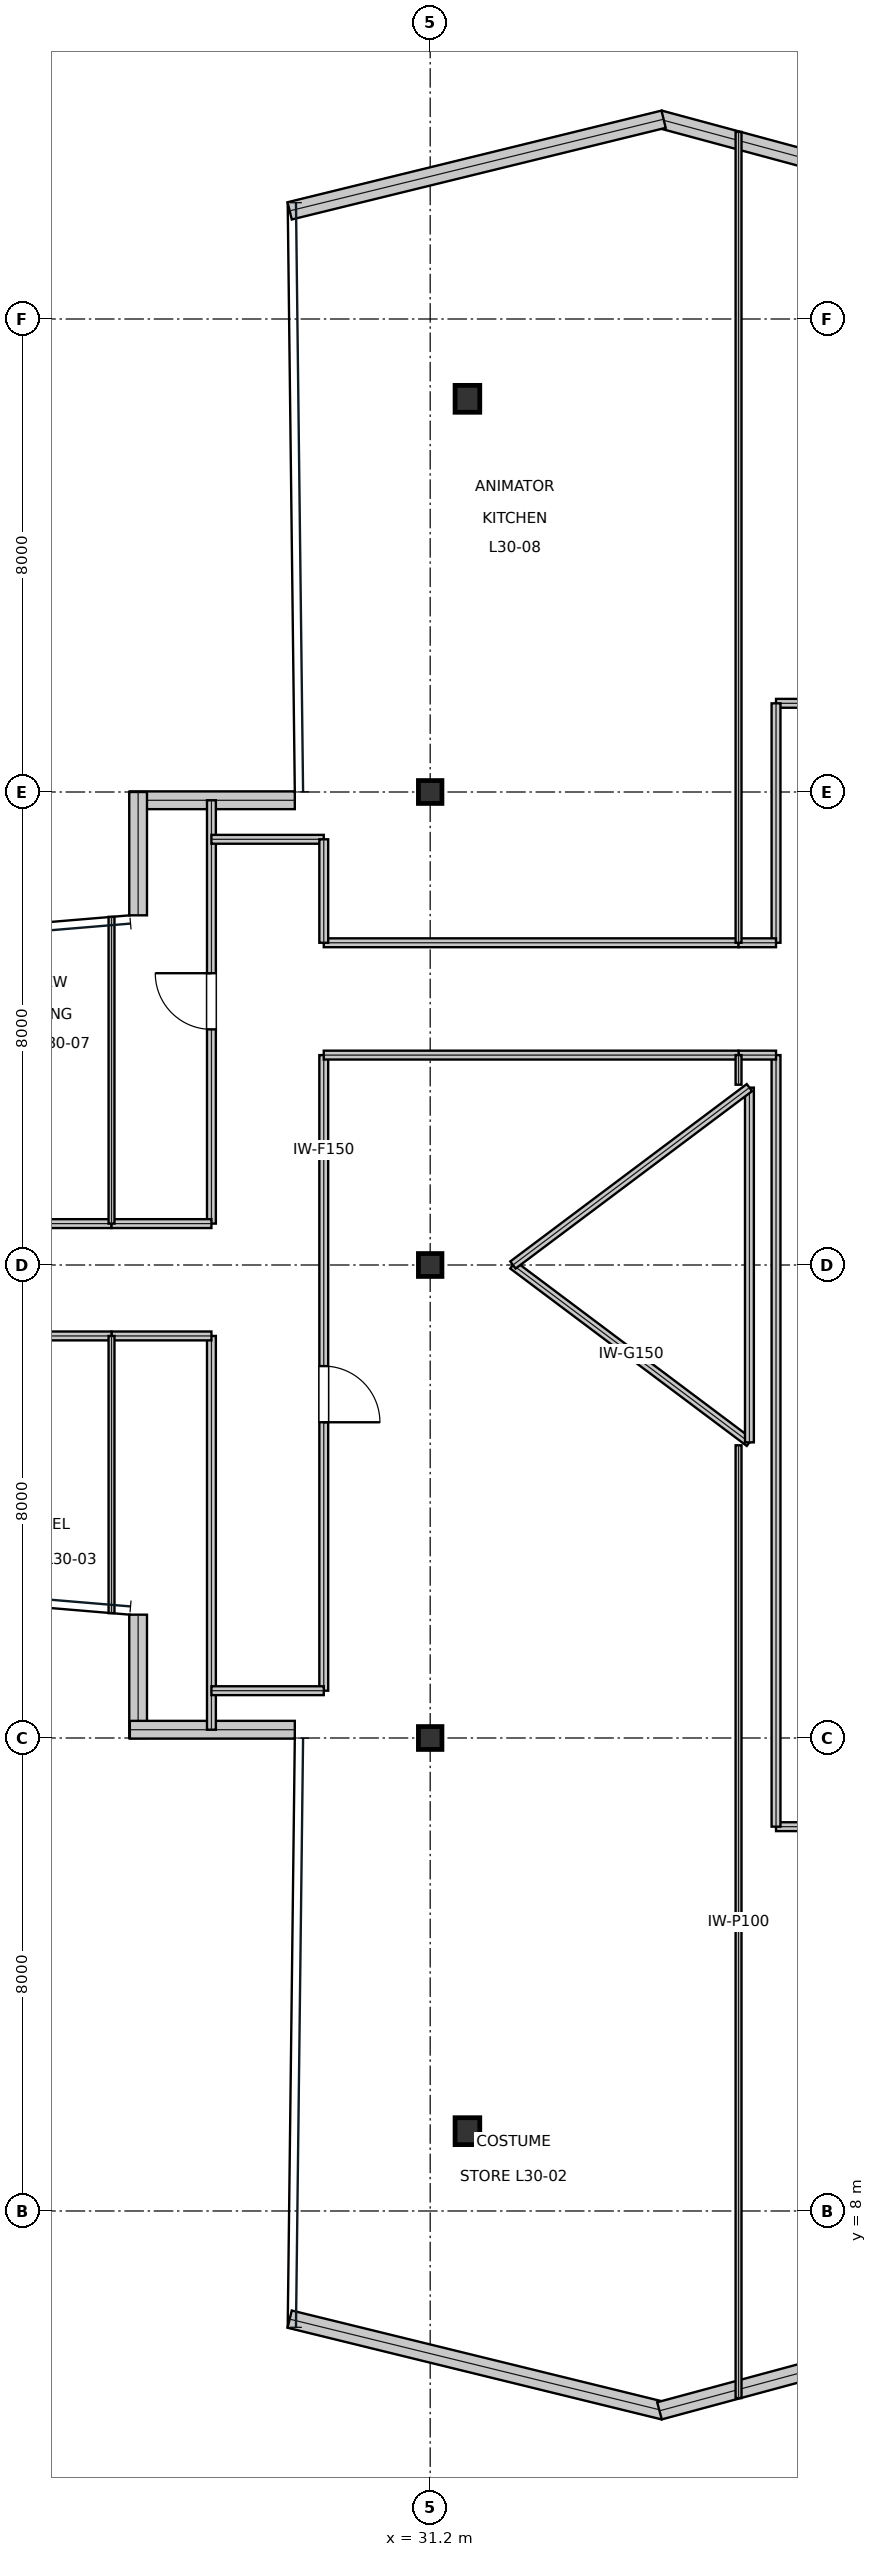
"""IFC4 building model, lengths in metres.
Left out: names, types, materials, properties, quantities, classifications, styles, units other than length and angle.
Written with IfcOpenShell. Run it as: python <this file> out.ifc"""

import sys

from ifc_helpers import new_model, si_unit, direction, frame, frame_2d, origin, origin_2d, place, context, subcontext, project, spatial, rectangle, i_section, extrude, element, fill, save


model = new_model("IFC4")
c1 = context("Model", 3, precision=1e-05, world=origin(), true_north=direction((0.0, 1.0)))
c2 = subcontext(c1, "Body", "Model", "MODEL_VIEW")
j1 = project(units=[si_unit("LENGTHUNIT", "METRE"), si_unit("PLANEANGLEUNIT", "RADIAN")], contexts=[c1])
p1 = place(None, origin())
s1 = spatial("IfcSite", under=j1, at=p1, CompositionType="ELEMENT")
p2 = place(p1, origin())
s2 = spatial("IfcBuilding", under=s1, at=p2, CompositionType="ELEMENT")
p3 = place(p2, frame((0.0, 0.0, 133.05)))
s3 = spatial("IfcBuildingStorey", under=s2, at=p3, CompositionType="ELEMENT", Elevation=133.05)
for number, where, z_axis, x_axis in (
    (1, (31.2, 16.0, 0.0), (0.0, 0.0, 1.0), (1.0, 0.0, 0.0)),
    (2, (31.2, 24.0, 0.0), (0.0, 0.0, 1.0), (1.0, 0.0, 0.0)),
    (3, (31.2, 32.0, 0.0), (0.0, 0.0, 1.0), (1.0, 0.0, 0.0)),
):
    element("IfcColumn", number, at=place(p3, frame(where, z_axis=z_axis, x_axis=x_axis)), inside=s3, PredefinedType="COLUMN", context=c2, shape_type="SweptSolid", body=[
        extrude(i_section(OverallWidth=0.398, OverallDepth=0.387, WebThickness=0.021, FlangeThickness=0.033, at=origin_2d()), origin(), (0.0, 0.0, 1.0), 4.044),
    ])
for number, where, z_axis, x_axis in (
    (4, (31.83, 38.65, 0.016), (0.0, 0.0, 1.0), (1.0, 0.0, 0.0)),
    (5, (31.83, 9.35, 0.016), (0.0, 0.0, 1.0), (1.0, 0.0, 0.0)),
):
    element("IfcColumn", number, at=place(p3, frame(where, z_axis=z_axis, x_axis=x_axis)), inside=s3, PredefinedType="COLUMN", context=c2, shape_type="SweptSolid", body=[
        extrude(i_section(OverallWidth=0.418, OverallDepth=0.455, WebThickness=0.042, FlangeThickness=0.068, at=origin_2d()), origin(), (0.0, 0.0, 1.0), 4.018),
    ])
p4 = place(p3, frame((41.404, 41.675, 0.0), z_axis=(0.0, 0.0, 1.0), x_axis=(-0.965531145086, 0.260287548434, 0.0)))
e6 = element("IfcWall", 6, at=p4, inside=s3, PredefinedType="STANDARD", context=c2, shape_type="SweptSolid", body=[
    extrude(rectangle(XDim=6.551, YDim=0.3, at=frame_2d((3.275, 0.0))), origin(), (0.0, 0.0, 1.0), 3.81),
])
p5 = place(p3, frame((35.148, 43.379, 0.0), z_axis=(0.0, 0.0, 1.0), x_axis=(-0.971267606245, -0.23798999361, 0.0)))
e7 = element("IfcWall", 7, at=p5, inside=s3, PredefinedType="STANDARD", context=c2, shape_type="SweptSolid", body=[
    extrude(rectangle(XDim=6.512, YDim=0.3, at=frame_2d((3.256, 0.0))), origin(), (0.0, 0.0, 1.0), 3.81),
])
p6 = place(p3, frame((28.91, 31.86, 0.0), z_axis=(0.0, 0.0, 1.0), x_axis=(-1.0, 0.0, 0.0)))
e8 = element("IfcWall", 8, at=p6, inside=s3, PredefinedType="STANDARD", context=c2, shape_type="SweptSolid", body=[
    extrude(rectangle(XDim=2.79, YDim=0.3, at=frame_2d((1.395, 0.0))), origin(), (0.0, 0.0, 1.0), 3.81),
])
for number, where, z_axis, x_axis in (
    (9, (26.26, 32.0, 0.0), (0.0, 0.0, 1.0), (0.0, -1.0, 0.0)),
    (10, (26.26, 18.086, 0.0), (0.0, 0.0, 1.0), (0.0, -1.0, 0.0)),
):
    element("IfcWall", number, at=place(p3, frame(where, z_axis=z_axis, x_axis=x_axis)), inside=s3, PredefinedType="STANDARD", context=c2, shape_type="SweptSolid", body=[
        extrude(rectangle(XDim=2.086, YDim=0.3, at=frame_2d((1.043, 0.0))), origin(), (0.0, 0.0, 1.0), 3.338),
    ])
p7 = place(p3, frame((26.12, 16.14, 0.0), z_axis=(0.0, 0.0, 1.0), x_axis=(1.0, 0.0, 0.0)))
e11 = element("IfcWall", 11, at=p7, inside=s3, PredefinedType="STANDARD", context=c2, shape_type="SweptSolid", body=[
    extrude(rectangle(XDim=2.79, YDim=0.3, at=frame_2d((1.395, 0.0))), origin(), (0.0, 0.0, 1.0), 3.81),
])
p8 = place(p3, frame((28.823, 6.171, 0.0), z_axis=(0.0, 0.0, 1.0), x_axis=(0.971267606245, -0.23798999361, 0.0)))
e12 = element("IfcWall", 12, at=p8, inside=s3, PredefinedType="STANDARD", context=c2, shape_type="SweptSolid", body=[
    extrude(rectangle(XDim=6.512, YDim=0.3, at=frame_2d((3.256, 0.0))), origin(), (0.0, 0.0, 1.0), 3.81),
])
p9 = place(p3, frame((35.079, 4.62, 0.0), z_axis=(0.0, 0.0, 1.0), x_axis=(0.965531145086, 0.260287548434, 0.0)))
e13 = element("IfcWall", 13, at=p9, inside=s3, PredefinedType="STANDARD", context=c2, shape_type="SweptSolid", body=[
    extrude(rectangle(XDim=6.551, YDim=0.3, at=frame_2d((3.275, 0.0))), origin(), (0.0, 0.0, 1.0), 3.81),
])
p10 = place(p3, frame((37.05, 14.5, 0.0), z_axis=(0.0, 0.0, 1.0), x_axis=(1.0, 0.0, 0.0)))
e14 = element("IfcWall", 14, at=p10, inside=s3, PredefinedType="PARTITIONING", context=c2, shape_type="SweptSolid", body=[
    extrude(rectangle(XDim=1.9, YDim=0.15, at=frame_2d((0.95, 0.0))), origin(), (0.0, 0.0, 1.0), 3.19),
])
p11 = place(p10, frame((0.475, 0.0, 0.0)))
e15 = element("IfcOpeningElement", 15, at=p11, cuts=e14, PredefinedType="OPENING", context=c2, shape_type="SweptSolid", body=[
    extrude(rectangle(XDim=0.95, YDim=2.15, at=frame_2d((0.475, 1.075))), frame((0.0, 0.085, 0.0), z_axis=(0.0, -1.0, 0.0), x_axis=(1.0, 0.0, 0.0)), (0.0, 0.0, 1.0), 0.17),
])
p12 = place(p3, frame((29.4, 16.8, 0.0), z_axis=(0.0, 0.0, 1.0), x_axis=(0.0, 1.0, 0.0)))
e16 = element("IfcWall", 16, at=p12, inside=s3, PredefinedType="PARTITIONING", context=c2, shape_type="SweptSolid", body=[
    extrude(rectangle(XDim=10.75, YDim=0.15, at=frame_2d((5.375, 0.0))), origin(), (0.0, 0.0, 1.0), 3.19),
])
p13 = place(p12, frame((4.54, 0.0, 0.0)))
e17 = element("IfcOpeningElement", 17, at=p13, cuts=e16, PredefinedType="OPENING", context=c2, shape_type="SweptSolid", body=[
    extrude(rectangle(XDim=0.95, YDim=2.15, at=frame_2d((0.475, 1.075))), frame((0.0, 0.085, 0.0), z_axis=(0.0, -1.0, 0.0), x_axis=(1.0, 0.0, 0.0)), (0.0, 0.0, 1.0), 0.17),
])
p14 = place(p3, frame((27.5, 24.7, 0.0), z_axis=(0.0, 0.0, 1.0), x_axis=(0.0, 1.0, 0.0)))
e18 = element("IfcWall", 18, at=p14, inside=s3, PredefinedType="PARTITIONING", context=c2, shape_type="SweptSolid", body=[
    extrude(rectangle(XDim=7.16, YDim=0.15, at=frame_2d((3.58, 0.0))), origin(), (0.0, 0.0, 1.0), 3.338),
])
p15 = place(p14, frame((3.285, 0.0, 0.0)))
e19 = element("IfcOpeningElement", 19, at=p15, cuts=e18, PredefinedType="OPENING", context=c2, shape_type="SweptSolid", body=[
    extrude(rectangle(XDim=0.95, YDim=2.15, at=frame_2d((0.475, 1.075))), frame((0.0, 0.085, 0.0), z_axis=(0.0, -1.0, 0.0), x_axis=(1.0, 0.0, 0.0)), (0.0, 0.0, 1.0), 0.17),
])
p16 = place(p3, frame((37.05, 33.5, 0.0), z_axis=(0.0, 0.0, 1.0), x_axis=(1.0, 0.0, 0.0)))
e20 = element("IfcWall", 20, at=p16, inside=s3, PredefinedType="PARTITIONING", context=c2, shape_type="SweptSolid", body=[
    extrude(rectangle(XDim=1.9, YDim=0.15, at=frame_2d((0.95, 0.0))), origin(), (0.0, 0.0, 1.0), 3.19),
])
p17 = place(p16, frame((0.475, 0.0, 0.0)))
e21 = element("IfcOpeningElement", 21, at=p17, cuts=e20, PredefinedType="OPENING", context=c2, shape_type="SweptSolid", body=[
    extrude(rectangle(XDim=0.95, YDim=2.15, at=frame_2d((0.475, 1.075))), frame((0.0, 0.085, 0.0), z_axis=(0.0, -1.0, 0.0), x_axis=(1.0, 0.0, 0.0)), (0.0, 0.0, 1.0), 0.17),
])
p18 = place(p3, frame((37.05, 14.5, 0.0), z_axis=(0.0, 0.0, 1.0), x_axis=(0.0, 1.0, 0.0)))
e22 = element("IfcWall", 22, at=p18, inside=s3, PredefinedType="PARTITIONING", context=c2, shape_type="SweptSolid", body=[
    extrude(rectangle(XDim=13.05, YDim=0.15, at=frame_2d((6.525, 0.0))), origin(), (0.0, 0.0, 1.0), 3.19),
])
p19 = place(p3, frame((36.416, 27.55, 0.0), z_axis=(0.0, 0.0, 1.0), x_axis=(1.0, 0.0, 0.0)))
e23 = element("IfcWall", 23, at=p19, inside=s3, PredefinedType="PARTITIONING", context=c2, shape_type="SweptSolid", body=[
    extrude(rectangle(XDim=0.634, YDim=0.15, at=frame_2d((0.317, 0.0))), origin(), (0.0, 0.0, 1.0), 3.443),
])
p20 = place(p3, frame((29.4, 27.55, 0.0), z_axis=(0.0, 0.0, 1.0), x_axis=(1.0, 0.0, 0.0)))
e24 = element("IfcWall", 24, at=p20, inside=s3, PredefinedType="PARTITIONING", context=c2, shape_type="SweptSolid", body=[
    extrude(rectangle(XDim=7.016, YDim=0.15, at=frame_2d((3.508, 0.0))), origin(), (0.0, 0.0, 1.0), 3.19),
])
p21 = place(p3, frame((27.5, 16.14, 0.0), z_axis=(0.0, 0.0, 1.0), x_axis=(0.0, 1.0, 0.0)))
e25 = element("IfcWall", 25, at=p21, inside=s3, PredefinedType="PARTITIONING", context=c2, shape_type="SweptSolid", body=[
    extrude(rectangle(XDim=6.66, YDim=0.15, at=frame_2d((3.33, 0.0))), origin(), (0.0, 0.0, 1.0), 3.338),
])
p22 = place(p3, frame((27.5, 16.8, 0.0), z_axis=(0.0, 0.0, 1.0), x_axis=(1.0, 0.0, 0.0)))
e26 = element("IfcWall", 26, at=p22, inside=s3, PredefinedType="PARTITIONING", context=c2, shape_type="SweptSolid", body=[
    extrude(rectangle(XDim=1.9, YDim=0.15, at=frame_2d((0.95, 0.0))), origin(), (0.0, 0.0, 1.0), 3.338),
])
p23 = place(p3, frame((25.81, 22.8, 0.0), z_axis=(0.0, 0.0, 1.0), x_axis=(1.0, 0.0, 0.0)))
e27 = element("IfcWall", 27, at=p23, inside=s3, PredefinedType="PARTITIONING", context=c2, shape_type="SweptSolid", body=[
    extrude(rectangle(XDim=1.69, YDim=0.15, at=frame_2d((0.845, 0.0))), origin(), (0.0, 0.0, 1.0), 3.81),
])
for number, where, z_axis, x_axis in (
    (28, (23.1, 22.8, 0.0), (0.0, 0.0, 1.0), (1.0, 0.0, 0.0)),
    (29, (23.1, 24.7, 0.0), (0.0, 0.0, 1.0), (1.0, 0.0, 0.0)),
):
    element("IfcWall", number, at=place(p3, frame(where, z_axis=z_axis, x_axis=x_axis)), inside=s3, PredefinedType="PARTITIONING", context=c2, shape_type="SweptSolid", body=[
        extrude(rectangle(XDim=2.71, YDim=0.15, at=frame_2d((1.355, 0.0))), origin(), (0.0, 0.0, 1.0), 3.19),
    ])
p24 = place(p3, frame((29.4, 29.45, 0.0), z_axis=(0.0, 0.0, 1.0), x_axis=(1.0, 0.0, 0.0)))
e30 = element("IfcWall", 30, at=p24, inside=s3, PredefinedType="PARTITIONING", context=c2, shape_type="SweptSolid", body=[
    extrude(rectangle(XDim=7.016, YDim=0.15, at=frame_2d((3.508, 0.0))), origin(), (0.0, 0.0, 1.0), 3.19),
])
p25 = place(p3, frame((27.5, 31.2, 0.0), z_axis=(0.0, 0.0, 1.0), x_axis=(1.0, 0.0, 0.0)))
e31 = element("IfcWall", 31, at=p25, inside=s3, PredefinedType="PARTITIONING", context=c2, shape_type="SweptSolid", body=[
    extrude(rectangle(XDim=1.9, YDim=0.15, at=frame_2d((0.95, 0.0))), origin(), (0.0, 0.0, 1.0), 3.338),
])
p26 = place(p3, frame((29.4, 29.45, 0.0), z_axis=(0.0, 0.0, 1.0), x_axis=(0.0, 1.0, 0.0)))
e32 = element("IfcWall", 32, at=p26, inside=s3, PredefinedType="PARTITIONING", context=c2, shape_type="SweptSolid", body=[
    extrude(rectangle(XDim=1.75, YDim=0.15, at=frame_2d((0.875, 0.0))), origin(), (0.0, 0.0, 1.0), 3.81),
])
p27 = place(p3, frame((25.81, 24.7, 0.0), z_axis=(0.0, 0.0, 1.0), x_axis=(1.0, 0.0, 0.0)))
e33 = element("IfcWall", 33, at=p27, inside=s3, PredefinedType="PARTITIONING", context=c2, shape_type="SweptSolid", body=[
    extrude(rectangle(XDim=1.69, YDim=0.15, at=frame_2d((0.845, 0.0))), origin(), (0.0, 0.0, 1.0), 3.19),
])
p28 = place(p3, frame((37.05, 29.45, 0.0), z_axis=(0.0, 0.0, 1.0), x_axis=(0.0, 1.0, 0.0)))
e34 = element("IfcWall", 34, at=p28, inside=s3, PredefinedType="PARTITIONING", context=c2, shape_type="SweptSolid", body=[
    extrude(rectangle(XDim=4.05, YDim=0.15, at=frame_2d((2.025, 0.0))), origin(), (0.0, 0.0, 1.0), 3.19),
])
p29 = place(p3, frame((36.416, 29.45, 0.0), z_axis=(0.0, 0.0, 1.0), x_axis=(1.0, 0.0, 0.0)))
e35 = element("IfcWall", 35, at=p29, inside=s3, PredefinedType="PARTITIONING", context=c2, shape_type="SweptSolid", body=[
    extrude(rectangle(XDim=0.634, YDim=0.15, at=frame_2d((0.317, 0.0))), origin(), (0.0, 0.0, 1.0), 3.81),
])
p30 = place(p3, frame((36.416, 4.836, 0.0), z_axis=(0.0, 0.0, 1.0), x_axis=(0.0, 1.0, 0.0)))
e36 = element("IfcWall", 36, at=p30, inside=s3, PredefinedType="PARTITIONING", context=c2, shape_type="SweptSolid", body=[
    extrude(rectangle(XDim=16.115, YDim=0.1, at=frame_2d((8.057, 0.0))), origin(), (0.0, 0.0, 1.0), 3.19),
])
p31 = place(p3, frame((36.416, 27.05, 0.0), z_axis=(0.0, 0.0, 1.0), x_axis=(0.0, 1.0, 0.0)))
e37 = element("IfcWall", 37, at=p31, inside=s3, PredefinedType="PARTITIONING", context=c2, shape_type="SweptSolid", body=[
    extrude(rectangle(XDim=0.5, YDim=0.1, at=frame_2d((0.25, 0.0))), origin(), (0.0, 0.0, 1.0), 3.81),
])
p32 = place(p3, frame((25.81, 18.112, 0.0), z_axis=(0.0, 0.0, 1.0), x_axis=(0.0, 1.0, 0.0)))
e38 = element("IfcWall", 38, at=p32, inside=s3, PredefinedType="PARTITIONING", context=c2, shape_type="SweptSolid", body=[
    extrude(rectangle(XDim=4.688, YDim=0.1, at=frame_2d((2.344, 0.0))), origin(), (0.0, 0.0, 1.0), 3.81),
])
p33 = place(p3, frame((25.81, 24.7, 0.0), z_axis=(0.0, 0.0, 1.0), x_axis=(0.0, 1.0, 0.0)))
e39 = element("IfcWall", 39, at=p33, inside=s3, PredefinedType="PARTITIONING", context=c2, shape_type="SweptSolid", body=[
    extrude(rectangle(XDim=5.188, YDim=0.1, at=frame_2d((2.594, 0.0))), origin(), (0.0, 0.0, 1.0), 3.19),
])
p34 = place(p3, frame((36.416, 29.45, 0.0), z_axis=(0.0, 0.0, 1.0), x_axis=(0.0, 1.0, 0.0)))
e40 = element("IfcWall", 40, at=p34, inside=s3, PredefinedType="PARTITIONING", context=c2, shape_type="SweptSolid", body=[
    extrude(rectangle(XDim=13.714, YDim=0.1, at=frame_2d((6.857, 0.0))), origin(), (0.0, 0.0, 1.0), 3.19),
])
p35 = place(p3, frame((32.6, 24.0, 0.0), z_axis=(0.0, 0.0, 1.0), x_axis=(0.8, -0.6, 0.0)))
e41 = element("IfcWall", 41, at=p35, inside=s3, PredefinedType="MOVABLE", context=c2, shape_type="SweptSolid", body=[
    extrude(rectangle(XDim=5.0, YDim=0.15, at=frame_2d((2.5, 0.0))), origin(), (0.0, 0.0, 1.0), 3.81),
])
p36 = place(p3, frame((36.6, 21.0, 0.0), z_axis=(0.0, 0.0, 1.0), x_axis=(0.0, 1.0, 0.0)))
e42 = element("IfcWall", 42, at=p36, inside=s3, PredefinedType="MOVABLE", context=c2, shape_type="SweptSolid", body=[
    extrude(rectangle(XDim=6.0, YDim=0.15, at=frame_2d((3.0, 0.0))), origin(), (0.0, 0.0, 1.0), 3.81),
])
p37 = place(p3, frame((36.6, 27.0, 0.0), z_axis=(0.0, 0.0, 1.0), x_axis=(-0.8, -0.6, 0.0)))
e43 = element("IfcWall", 43, at=p37, inside=s3, PredefinedType="MOVABLE", context=c2, shape_type="SweptSolid", body=[
    extrude(rectangle(XDim=5.0, YDim=0.15, at=frame_2d((2.5, 0.0))), origin(), (0.0, 0.0, 1.0), 3.81),
])
p38 = place(p13, frame((0.95, 0.0, 0.0), z_axis=(0.0, 0.0, 1.0), x_axis=(-1.0, 0.0, 0.0)))
e44 = element("IfcDoor", 44, at=p38, inside=s3, OperationType="SINGLE_SWING_RIGHT", PredefinedType="DOOR", context=c2, shape_type="SweptSolid", body=[
    extrude(rectangle(XDim=0.95, YDim=2.15, at=frame_2d((0.475, 1.075))), frame((0.0, 0.025, 0.0), z_axis=(0.0, -1.0, 0.0), x_axis=(1.0, 0.0, 0.0)), (0.0, 0.0, 1.0), 0.05),
])
fill(e17, e44)
p39 = place(p15, origin())
e45 = element("IfcDoor", 45, at=p39, inside=s3, OperationType="SINGLE_SWING_RIGHT", PredefinedType="DOOR", context=c2, shape_type="SweptSolid", body=[
    extrude(rectangle(XDim=0.95, YDim=2.15, at=frame_2d((0.475, 1.075))), frame((0.0, 0.025, 0.0), z_axis=(0.0, -1.0, 0.0), x_axis=(1.0, 0.0, 0.0)), (0.0, 0.0, 1.0), 0.05),
])
fill(e19, e45)
save(model, sys.argv[1])
